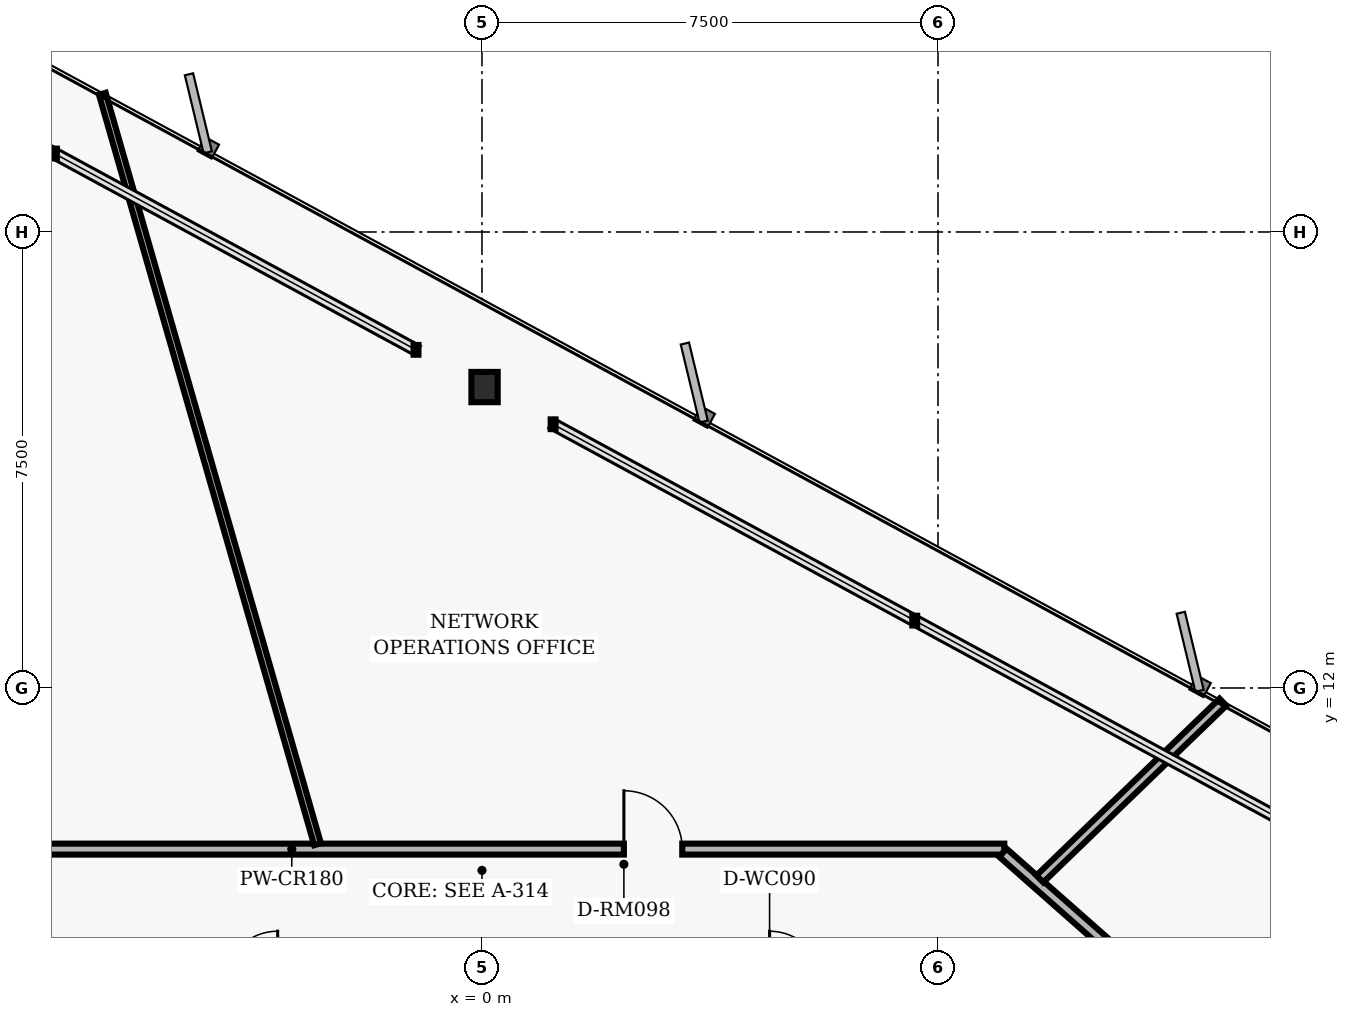
"""IFC4 building model, lengths in metres.
Left out: names, types, materials, properties, quantities, classifications, styles, units other than length and angle.
Written with IfcOpenShell. Run it as: python <this file> out.ifc"""

import sys

from ifc_helpers import new_model, si_unit, direction, frame, frame_2d, origin, origin_2d, place, context, subcontext, project, spatial, rectangle, i_section, extrude, element, fill, save


model = new_model("IFC4")
c1 = context("Model", 3, precision=1e-05, world=origin(), true_north=direction((0.0, 1.0)))
c2 = subcontext(c1, "Body", "Model", "MODEL_VIEW")
j1 = project(units=[si_unit("LENGTHUNIT", "METRE"), si_unit("PLANEANGLEUNIT", "RADIAN")], contexts=[c1])
p1 = place(None, origin())
s1 = spatial("IfcSite", under=j1, at=p1, CompositionType="ELEMENT")
p2 = place(p1, origin())
s2 = spatial("IfcBuilding", under=s1, at=p2, CompositionType="ELEMENT")
p3 = place(p2, frame((0.0, 0.0, 22.24)))
s3 = spatial("IfcBuildingStorey", under=s2, at=p3, CompositionType="ELEMENT", Elevation=22.24)
p4 = place(p3, frame((0.043, 16.949, 0.0), z_axis=(0.0, 0.0, 1.0), x_axis=(1.0, 0.0, 0.0)))
e1 = element("IfcColumn", 1, at=p4, inside=s3, PredefinedType="COLUMN", context=c2, shape_type="SweptSolid", body=[
    extrude(i_section(OverallWidth=0.432, OverallDepth=0.498, WebThickness=0.056, FlangeThickness=0.089, FilletRadius=0.025, at=origin_2d()), origin(), (0.0, 0.0, 1.0), 3.36),
])
p5 = place(p3, frame((-8.59, 9.35, 0.0), z_axis=(0.0, 0.0, 1.0), x_axis=(1.0, 0.0, 0.0)))
e2 = element("IfcWall", 2, at=p5, inside=s3, PredefinedType="PARTITIONING", context=c2, shape_type="SweptSolid", body=[
    extrude(rectangle(XDim=17.18, YDim=0.18, at=frame_2d((8.59, 0.0))), origin(), (0.0, 0.0, 1.0), 2.587),
])
p6 = place(p5, frame((10.924, 0.0, 0.0)))
e3 = element("IfcOpeningElement", 3, at=p6, cuts=e2, PredefinedType="OPENING", context=c2, shape_type="SweptSolid", body=[
    extrude(rectangle(XDim=0.96, YDim=2.02, at=frame_2d((0.48, 1.01))), frame((0.0, 0.1, 0.0), z_axis=(0.0, -1.0, 0.0), x_axis=(1.0, 0.0, 0.0)), (0.0, 0.0, 1.0), 0.2),
])
p7 = place(p3, frame((8.567, 9.29, 0.0), z_axis=(0.0, 0.0, 1.0), x_axis=(0.749626463267, -0.66186113768, 0.0)))
e4 = element("IfcWall", 4, at=p7, inside=s3, PredefinedType="PARTITIONING", context=c2, shape_type="SweptSolid", body=[
    extrude(rectangle(XDim=6.27, YDim=0.18, at=frame_2d((3.135, 0.0))), origin(), (0.0, 0.0, 1.0), 2.587),
])
p8 = place(p7, frame((2.895, 0.0, 0.0)))
e5 = element("IfcOpeningElement", 5, at=p8, cuts=e4, PredefinedType="OPENING", context=c2, shape_type="SweptSolid", body=[
    extrude(rectangle(XDim=0.96, YDim=2.02, at=frame_2d((0.48, 1.01))), frame((0.0, 0.1, 0.0), z_axis=(0.0, -1.0, 0.0), x_axis=(1.0, 0.0, 0.0)), (0.0, 0.0, 1.0), 0.2),
])
p9 = place(p3, frame((9.175, 8.861, 0.0), z_axis=(0.0, 0.0, 1.0), x_axis=(0.719367279815, 0.694629913502, 0.0)))
e6 = element("IfcWall", 6, at=p9, inside=s3, PredefinedType="PARTITIONING", context=c2, shape_type="SweptSolid", body=[
    extrude(rectangle(XDim=4.185, YDim=0.16, at=frame_2d((2.092, 0.0))), origin(), (0.0, 0.0, 1.0), 3.073),
])
p10 = place(p3, frame((-2.704, 9.43, 0.0), z_axis=(0.0, 0.0, 1.0), x_axis=(-0.275627518328, 0.961264516738, 0.0)))
e7 = element("IfcWall", 7, at=p10, inside=s3, PredefinedType="MOVABLE", context=c2, shape_type="SweptSolid", body=[
    extrude(rectangle(XDim=12.841, YDim=0.115, at=frame_2d((6.42, 0.0))), origin(), (0.0, 0.0, 1.0), 3.073),
])
p11 = place(p6, origin())
e8 = element("IfcDoor", 8, at=p11, inside=s3, OperationType="SINGLE_SWING_LEFT", PredefinedType="DOOR", context=c2, shape_type="SweptSolid", body=[
    extrude(rectangle(XDim=0.96, YDim=2.02, at=frame_2d((0.48, 1.01))), frame((0.0, 0.025, 0.0), z_axis=(0.0, -1.0, 0.0), x_axis=(1.0, 0.0, 0.0)), (0.0, 0.0, 1.0), 0.05),
])
fill(e3, e8)
save(model, sys.argv[1])
